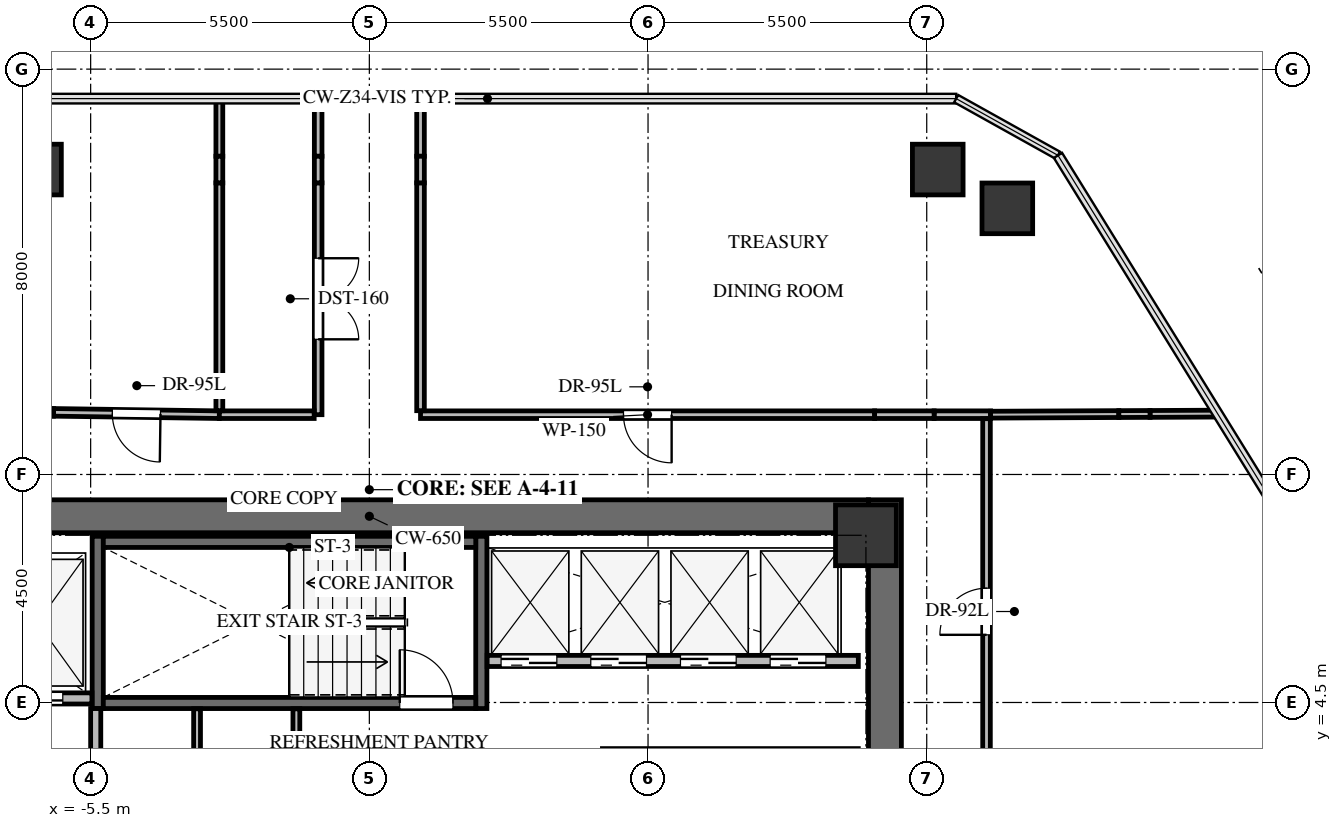
"""IFC4 building model, lengths in metres.
Left out: names, types, materials, properties, quantities, classifications, styles, units other than length and angle.
Written with IfcOpenShell. Run it as: python <this file> out.ifc"""

import sys

from ifc_helpers import new_model, si_unit, direction, frame, frame_2d, origin, origin_2d, place, context, subcontext, project, spatial, rectangle, extrude, source, transform, mapped, element, fill, save


model = new_model("IFC4")
c1 = context("Model", 3, precision=1e-05, world=origin(), true_north=direction((0.0, 1.0)))
c2 = subcontext(c1, "Body", "Model", "MODEL_VIEW")
j1 = project(units=[si_unit("LENGTHUNIT", "METRE"), si_unit("PLANEANGLEUNIT", "RADIAN")], contexts=[c1])
p1 = place(None, origin())
s1 = spatial("IfcSite", under=j1, at=p1, CompositionType="ELEMENT")
p2 = place(p1, origin())
s2 = spatial("IfcBuilding", under=s1, at=p2, CompositionType="ELEMENT")
p3 = place(p2, frame((0.0, 0.0, 203.2)))
s3 = spatial("IfcBuildingStorey", under=s2, at=p3, CompositionType="ELEMENT", Elevation=203.2)
p4 = place(p3, frame((10.175, -8.5, 0.0), z_axis=(0.0, 0.0, 1.0), x_axis=(0.0, 1.0, 0.0)))
e1 = element("IfcWall", 1, at=p4, inside=s3, PredefinedType="SHEAR", context=c2, shape_type="SweptSolid", body=[
    extrude(rectangle(XDim=17.0, YDim=0.65, at=frame_2d((8.5, 0.0))), origin(), (0.0, 0.0, 1.0), 3.0),
])
p5 = place(p3, frame((-9.85, 8.175, 0.0), z_axis=(0.0, 0.0, 1.0), x_axis=(1.0, 0.0, 0.0)))
e2 = element("IfcWall", 2, at=p5, inside=s3, PredefinedType="SHEAR", context=c2, shape_type="SweptSolid", body=[
    extrude(rectangle(XDim=19.7, YDim=0.65, at=frame_2d((9.85, 0.0))), origin(), (0.0, 0.0, 1.0), 3.0),
])
for number, where, z_axis, x_axis in (
    (3, (2.21, 4.38, -0.24), (0.0, 0.0, 1.0), (0.0, 1.0, 0.0)),
    (4, (-5.36, 7.78, -0.24), (0.0, 0.0, 1.0), (0.0, -1.0, 0.0)),
):
    element("IfcWall", number, at=place(p3, frame(where, z_axis=z_axis, x_axis=x_axis)), inside=s3, PredefinedType="SHEAR", context=c2, shape_type="SweptSolid", body=[
        extrude(rectangle(XDim=3.4, YDim=0.22, at=frame_2d((1.7, 0.0))), origin(), (0.0, 0.0, 1.0), 3.0),
    ])
p6 = place(p3, frame((-5.25, 4.49, -0.24), z_axis=(0.0, 0.0, 1.0), x_axis=(1.0, 0.0, 0.0)))
e5 = element("IfcWall", 5, at=p6, inside=s3, PredefinedType="SHEAR", context=c2, shape_type="SweptSolid", body=[
    extrude(rectangle(XDim=7.35, YDim=0.22, at=frame_2d((3.675, 0.0))), origin(), (0.0, 0.0, 1.0), 3.0),
])
p7 = place(p6, frame((5.85, 0.0, 0.0)))
e6 = element("IfcOpeningElement", 6, at=p7, cuts=e5, PredefinedType="OPENING", context=c2, shape_type="SweptSolid", body=[
    extrude(rectangle(XDim=1.05, YDim=2.15, at=frame_2d((0.525, 1.075))), frame((0.0, 0.12, 0.0), z_axis=(0.0, -1.0, 0.0), x_axis=(1.0, 0.0, 0.0)), (0.0, 0.0, 1.0), 0.24),
])
p8 = place(p3, frame((2.1, 7.67, -0.24), z_axis=(0.0, 0.0, 1.0), x_axis=(-1.0, 0.0, 0.0)))
e7 = element("IfcWall", 7, at=p8, inside=s3, PredefinedType="SHEAR", context=c2, shape_type="SweptSolid", body=[
    extrude(rectangle(XDim=7.35, YDim=0.22, at=frame_2d((3.675, 0.0))), origin(), (0.0, 0.0, 1.0), 3.0),
])
m1 = source(origin(), c2, "Body", "SweptSolid", [
    extrude(rectangle(XDim=1.2, YDim=1.2, at=origin_2d()), origin(), (0.0, 0.0, 1.0), 3.0),
])
p9 = place(p3, frame((9.8, 7.8, -0.24), z_axis=(0.0, 0.0, 1.0), x_axis=(1.0, 0.0, 0.0)))
e8 = element("IfcColumn", 8, at=p9, inside=s3, PredefinedType="COLUMN", context=c2, shape_type="MappedRepresentation", body=[
    mapped(m1, transform((0.0, 0.0, 0.0), x_axis=(1.0, 0.0, 0.0), y_axis=(0.0, 1.0, 0.0), z_axis=(0.0, 0.0, 1.0), scale=1.0)),
])
m2 = source(origin(), c2, "Body", "SweptSolid", [
    extrude(rectangle(XDim=1.0, YDim=1.0, at=origin_2d()), origin(), (0.0, 0.0, 1.0), 3.0),
])
for number, where, z_axis, x_axis in (
    (9, (-6.579, 15.018, -0.24), (0.0, 0.0, 1.0), (1.0, 0.0, 0.0)),
    (10, (11.218, 15.018, -0.24), (0.0, 0.0, 1.0), (1.0, 0.0, 0.0)),
    (11, (12.591, 14.252, -0.24), (0.0, 0.0, 1.0), (1.0, 0.0, 0.0)),
):
    element("IfcColumn", number, at=place(p3, frame(where, z_axis=z_axis, x_axis=x_axis)), inside=s3, PredefinedType="COLUMN", context=c2, shape_type="MappedRepresentation", body=[
        mapped(m2, transform((0.0, 0.0, 0.0), x_axis=(1.0, 0.0, 0.0), y_axis=(0.0, 1.0, 0.0), z_axis=(0.0, 0.0, 1.0), scale=1.0)),
    ])
p10 = place(p3, frame((-9.65, 4.58, 0.0), z_axis=(0.0, 0.0, 1.0), x_axis=(1.0, 0.0, 0.0)))
e12 = element("IfcWall", 12, at=p10, inside=s3, PredefinedType="SOLIDWALL", context=c2, shape_type="SweptSolid", body=[
    extrude(rectangle(XDim=4.175, YDim=0.22, at=frame_2d((2.087, 0.0))), origin(), (0.0, 0.0, 1.0), 2.745),
])
p11 = place(p10, frame((0.4, 0.0, 0.0)))
e13 = element("IfcOpeningElement", 13, at=p11, cuts=e12, PredefinedType="OPENING", context=c2, shape_type="SweptSolid", body=[
    extrude(rectangle(XDim=1.2, YDim=2.15, at=frame_2d((0.6, 1.075))), frame((0.0, 0.12, 0.0), z_axis=(0.0, -1.0, 0.0), x_axis=(1.0, 0.0, 0.0)), (0.0, 0.0, 1.0), 0.24),
])
p12 = place(p10, frame((2.4, 0.0, 0.0)))
e14 = element("IfcOpeningElement", 14, at=p12, cuts=e12, PredefinedType="OPENING", context=c2, shape_type="SweptSolid", body=[
    extrude(rectangle(XDim=1.2, YDim=2.15, at=frame_2d((0.6, 1.075))), frame((0.0, 0.12, 0.0), z_axis=(0.0, -1.0, 0.0), x_axis=(1.0, 0.0, 0.0)), (0.0, 0.0, 1.0), 0.24),
])
p13 = place(p3, frame((-5.4, 0.354, 0.0), z_axis=(0.0, 0.0, 1.0), x_axis=(0.0, 1.0, 0.0)))
e15 = element("IfcWall", 15, at=p13, inside=s3, PredefinedType="SOLIDWALL", context=c2, shape_type="SweptSolid", body=[
    extrude(rectangle(XDim=4.026, YDim=0.2, at=frame_2d((2.013, 0.0))), origin(), (0.0, 0.0, 1.0), 2.745),
])
p14 = place(p13, frame((0.246, 0.0, 0.0)))
e16 = element("IfcOpeningElement", 16, at=p14, cuts=e15, PredefinedType="OPENING", context=c2, shape_type="SweptSolid", body=[
    extrude(rectangle(XDim=1.0, YDim=2.15, at=frame_2d((0.5, 1.075))), frame((0.0, 0.11, 0.0), z_axis=(0.0, -1.0, 0.0), x_axis=(1.0, 0.0, 0.0)), (0.0, 0.0, 1.0), 0.22),
])
p15 = place(p3, frame((2.325, 5.32, 0.0), z_axis=(0.0, 0.0, 1.0), x_axis=(1.0, 0.0, 0.0)))
e17 = element("IfcWall", 17, at=p15, inside=s3, PredefinedType="SOLIDWALL", context=c2, shape_type="SweptSolid", body=[
    extrude(rectangle(XDim=7.325, YDim=0.22, at=frame_2d((3.663, 0.0))), origin(), (0.0, 0.0, 1.0), 2.745),
])
p16 = place(p15, frame((0.275, 0.0, 0.0)))
e18 = element("IfcOpeningElement", 18, at=p16, cuts=e17, PredefinedType="OPENING", context=c2, shape_type="SweptSolid", body=[
    extrude(rectangle(XDim=1.1, YDim=2.15, at=frame_2d((0.55, 1.075))), frame((0.0, 0.12, 0.0), z_axis=(0.0, -1.0, 0.0), x_axis=(1.0, 0.0, 0.0)), (0.0, 0.0, 1.0), 0.24),
])
p17 = place(p15, frame((2.045, 0.0, 0.0)))
e19 = element("IfcOpeningElement", 19, at=p17, cuts=e17, PredefinedType="OPENING", context=c2, shape_type="SweptSolid", body=[
    extrude(rectangle(XDim=1.1, YDim=2.15, at=frame_2d((0.55, 1.075))), frame((0.0, 0.12, 0.0), z_axis=(0.0, -1.0, 0.0), x_axis=(1.0, 0.0, 0.0)), (0.0, 0.0, 1.0), 0.24),
])
p18 = place(p15, frame((3.815, 0.0, 0.0)))
e20 = element("IfcOpeningElement", 20, at=p18, cuts=e17, PredefinedType="OPENING", context=c2, shape_type="SweptSolid", body=[
    extrude(rectangle(XDim=1.1, YDim=2.15, at=frame_2d((0.55, 1.075))), frame((0.0, 0.12, 0.0), z_axis=(0.0, -1.0, 0.0), x_axis=(1.0, 0.0, 0.0)), (0.0, 0.0, 1.0), 0.24),
])
p19 = place(p15, frame((5.585, 0.0, 0.0)))
e21 = element("IfcOpeningElement", 21, at=p19, cuts=e17, PredefinedType="OPENING", context=c2, shape_type="SweptSolid", body=[
    extrude(rectangle(XDim=1.1, YDim=2.15, at=frame_2d((0.55, 1.075))), frame((0.0, 0.12, 0.0), z_axis=(0.0, -1.0, 0.0), x_axis=(1.0, 0.0, 0.0)), (0.0, 0.0, 1.0), 0.24),
])
p20 = place(p3, frame((-2.96, 10.18, 0.0), z_axis=(0.0, 0.0, 1.0), x_axis=(-0.999900650504, 0.014095712907, 0.0)))
e22 = element("IfcWall", 22, at=p20, inside=s3, PredefinedType="PARTITIONING", context=c2, shape_type="SweptSolid", body=[
    extrude(rectangle(XDim=3.273, YDim=0.15, at=frame_2d((1.637, 0.0))), origin(), (0.0, 0.0, 1.0), 2.308),
])
p21 = place(p20, frame((1.162, 0.0, 0.0)))
e23 = element("IfcOpeningElement", 23, at=p21, cuts=e22, PredefinedType="OPENING", context=c2, shape_type="SweptSolid", body=[
    extrude(rectangle(XDim=0.95, YDim=2.1, at=frame_2d((0.475, 1.05))), frame((0.0, 0.085, 0.0), z_axis=(0.0, -1.0, 0.0), x_axis=(1.0, 0.0, 0.0)), (0.0, 0.0, 1.0), 0.17),
])
p22 = place(p3, frame((-6.233, 10.226, 0.0), z_axis=(0.0, 0.0, 1.0), x_axis=(-0.999898893801, 0.014219781108, 0.0)))
e24 = element("IfcWall", 24, at=p22, inside=s3, PredefinedType="PARTITIONING", context=c2, shape_type="SweptSolid", body=[
    extrude(rectangle(XDim=1.082, YDim=0.15, at=frame_2d((0.541, 0.0))), origin(), (0.0, 0.0, 1.0), 1.942),
])
p23 = place(p3, frame((-1.01, 16.418, 0.0), z_axis=(0.0, 0.0, 1.0), x_axis=(0.0, -1.0, 0.0)))
e25 = element("IfcWall", 25, at=p23, inside=s3, PredefinedType="PARTITIONING", context=c2, shape_type="SweptSolid", body=[
    extrude(rectangle(XDim=1.137, YDim=0.15, at=frame_2d((0.569, 0.0))), origin(), (0.0, 0.0, 1.0), 2.745),
])
p24 = place(p3, frame((-1.01, 14.755, 0.0), z_axis=(0.0, 0.0, 1.0), x_axis=(0.0, -1.0, 0.0)))
e26 = element("IfcWall", 26, at=p24, inside=s3, PredefinedType="PARTITIONING", context=c2, shape_type="SweptSolid", body=[
    extrude(rectangle(XDim=4.575, YDim=0.15, at=frame_2d((2.288, 0.0))), origin(), (0.0, 0.0, 1.0), 2.745),
])
p25 = place(p24, frame((1.488, 0.0, 0.0)))
e27 = element("IfcOpeningElement", 27, at=p25, cuts=e26, PredefinedType="OPENING", context=c2, shape_type="SweptSolid", body=[
    extrude(rectangle(XDim=1.6, YDim=2.15, at=frame_2d((0.8, 1.075))), frame((0.0, 0.085, 0.0), z_axis=(0.0, -1.0, 0.0), x_axis=(1.0, 0.0, 0.0)), (0.0, 0.0, 1.0), 0.17),
])
p26 = place(p3, frame((-1.01, 15.281, 0.0), z_axis=(0.0, 0.0, 1.0), x_axis=(0.0, -1.0, 0.0)))
e28 = element("IfcWall", 28, at=p26, inside=s3, PredefinedType="PARTITIONING", context=c2, shape_type="SweptSolid", body=[
    extrude(rectangle(XDim=0.525, YDim=0.15, at=frame_2d((0.263, 0.0))), origin(), (0.0, 0.0, 1.0), 2.099),
])
p27 = place(p3, frame((-1.089, 10.18, 0.0), z_axis=(0.0, 0.0, 1.0), x_axis=(-1.0, 0.0, 0.0)))
e29 = element("IfcWall", 29, at=p27, inside=s3, PredefinedType="PARTITIONING", context=c2, shape_type="SweptSolid", body=[
    extrude(rectangle(XDim=1.871, YDim=0.15, at=frame_2d((0.936, 0.0))), origin(), (0.0, 0.0, 1.0), 2.745),
])
p28 = place(p3, frame((12.26, 10.18, 0.0), z_axis=(0.0, 0.0, 1.0), x_axis=(-1.0, 0.0, 0.0)))
e30 = element("IfcWall", 30, at=p28, inside=s3, PredefinedType="PARTITIONING", context=c2, shape_type="SweptSolid", body=[
    extrude(rectangle(XDim=1.114, YDim=0.15, at=frame_2d((0.557, 0.0))), origin(), (0.0, 0.0, 1.0), 2.745),
])
p29 = place(p3, frame((9.971, 10.18, 0.0), z_axis=(0.0, 0.0, 1.0), x_axis=(-1.0, 0.0, 0.0)))
e31 = element("IfcWall", 31, at=p29, inside=s3, PredefinedType="PARTITIONING", context=c2, shape_type="SweptSolid", body=[
    extrude(rectangle(XDim=8.961, YDim=0.15, at=frame_2d((4.481, 0.0))), origin(), (0.0, 0.0, 1.0), 2.308),
])
p30 = place(p29, frame((4.006, 0.0, 0.0)))
e32 = element("IfcOpeningElement", 32, at=p30, cuts=e31, PredefinedType="OPENING", context=c2, shape_type="SweptSolid", body=[
    extrude(rectangle(XDim=0.95, YDim=2.1, at=frame_2d((0.475, 1.05))), frame((0.0, 0.085, 0.0), z_axis=(0.0, -1.0, 0.0), x_axis=(1.0, 0.0, 0.0)), (0.0, 0.0, 1.0), 0.17),
])
p31 = place(p3, frame((11.146, 10.18, 0.0), z_axis=(0.0, 0.0, 1.0), x_axis=(-1.0, 0.0, 0.0)))
e33 = element("IfcWall", 33, at=p31, inside=s3, PredefinedType="PARTITIONING", context=c2, shape_type="SweptSolid", body=[
    extrude(rectangle(XDim=1.174, YDim=0.15, at=frame_2d((0.587, 0.0))), origin(), (0.0, 0.0, 1.0), 1.942),
])
p32 = place(p3, frame((1.01, 10.259, 0.0), z_axis=(0.0, 0.0, 1.0), x_axis=(0.0, 1.0, 0.0)))
e34 = element("IfcWall", 34, at=p32, inside=s3, PredefinedType="PARTITIONING", context=c2, shape_type="SweptSolid", body=[
    extrude(rectangle(XDim=4.496, YDim=0.15, at=frame_2d((2.248, 0.0))), origin(), (0.0, 0.0, 1.0), 2.745),
])
p33 = place(p3, frame((1.01, 15.281, 0.0), z_axis=(0.0, 0.0, 1.0), x_axis=(0.0, 1.0, 0.0)))
e35 = element("IfcWall", 35, at=p33, inside=s3, PredefinedType="PARTITIONING", context=c2, shape_type="SweptSolid", body=[
    extrude(rectangle(XDim=1.137, YDim=0.15, at=frame_2d((0.569, 0.0))), origin(), (0.0, 0.0, 1.0), 2.745),
])
p34 = place(p3, frame((1.01, 14.755, 0.0), z_axis=(0.0, 0.0, 1.0), x_axis=(0.0, 1.0, 0.0)))
e36 = element("IfcWall", 36, at=p34, inside=s3, PredefinedType="PARTITIONING", context=c2, shape_type="SweptSolid", body=[
    extrude(rectangle(XDim=0.525, YDim=0.15, at=frame_2d((0.263, 0.0))), origin(), (0.0, 0.0, 1.0), 2.099),
])
p35 = place(p3, frame((12.18, 2.49, 0.0), z_axis=(0.0, 0.0, 1.0), x_axis=(0.0, 1.0, 0.0)))
e37 = element("IfcWall", 37, at=p35, inside=s3, PredefinedType="PARTITIONING", context=c2, shape_type="SweptSolid", body=[
    extrude(rectangle(XDim=7.611, YDim=0.15, at=frame_2d((3.806, 0.0))), origin(), (0.0, 0.0, 1.0), 2.745),
])
p36 = place(p35, frame((3.345, 0.0, 0.0)))
e38 = element("IfcOpeningElement", 38, at=p36, cuts=e37, PredefinedType="OPENING", context=c2, shape_type="SweptSolid", body=[
    extrude(rectangle(XDim=0.92, YDim=2.1, at=frame_2d((0.46, 1.05))), frame((0.0, 0.085, 0.0), z_axis=(0.0, -1.0, 0.0), x_axis=(1.0, 0.0, 0.0)), (0.0, 0.0, 1.0), 0.17),
])
p37 = place(p3, frame((-3.4, 4.375, 0.0), z_axis=(0.0, 0.0, 1.0), x_axis=(0.0, -1.0, 0.0)))
e39 = element("IfcWall", 39, at=p37, inside=s3, PredefinedType="PARTITIONING", context=c2, shape_type="SweptSolid", body=[
    extrude(rectangle(XDim=2.586, YDim=0.135, at=frame_2d((1.293, 0.0))), origin(), (0.0, 0.0, 1.0), 2.745),
])
p38 = place(p3, frame((-1.44, 4.375, 0.0), z_axis=(0.0, 0.0, 1.0), x_axis=(0.0, -1.0, 0.0)))
e40 = element("IfcWall", 40, at=p38, inside=s3, PredefinedType="PARTITIONING", context=c2, shape_type="SweptSolid", body=[
    extrude(rectangle(XDim=2.561, YDim=0.135, at=frame_2d((1.281, 0.0))), origin(), (0.0, 0.0, 1.0), 2.745),
])
p39 = place(p3, frame((-2.96, 16.418, 0.0), z_axis=(0.0, 0.0, 1.0), x_axis=(0.0, -1.0, 0.0)))
e41 = element("IfcWall", 41, at=p39, inside=s3, PredefinedType="PARTITIONING", context=c2, shape_type="SweptSolid", body=[
    extrude(rectangle(XDim=1.137, YDim=0.135, at=frame_2d((0.569, 0.0))), origin(), (0.0, 0.0, 1.0), 2.745),
])
p40 = place(p3, frame((-2.96, 14.755, 0.0), z_axis=(0.0, 0.0, 1.0), x_axis=(0.0, -1.0, 0.0)))
e42 = element("IfcWall", 42, at=p40, inside=s3, PredefinedType="PARTITIONING", context=c2, shape_type="SweptSolid", body=[
    extrude(rectangle(XDim=4.496, YDim=0.135, at=frame_2d((2.248, 0.0))), origin(), (0.0, 0.0, 1.0), 2.745),
])
p41 = place(p3, frame((-2.96, 15.281, 0.0), z_axis=(0.0, 0.0, 1.0), x_axis=(0.0, -1.0, 0.0)))
e43 = element("IfcWall", 43, at=p41, inside=s3, PredefinedType="PARTITIONING", context=c2, shape_type="SweptSolid", body=[
    extrude(rectangle(XDim=0.525, YDim=0.135, at=frame_2d((0.263, 0.0))), origin(), (0.0, 0.0, 1.0), 2.099),
])
p42 = place(p3, frame((16.74, 10.201, 0.0), z_axis=(0.0, 0.0, 1.0), x_axis=(-0.999989521507, -0.004577868163, 0.0)))
e44 = element("IfcWall", 44, at=p42, inside=s3, PredefinedType="PARTITIONING", context=c2, shape_type="SweptSolid", body=[
    extrude(rectangle(XDim=1.333, YDim=0.135, at=frame_2d((0.667, 0.0))), origin(), (0.0, 0.0, 1.0), 2.745),
])
p43 = place(p3, frame((14.791, 10.192, 0.0), z_axis=(0.0, 0.0, 1.0), x_axis=(-0.999989725302, -0.004533132435, 0.0)))
e45 = element("IfcWall", 45, at=p43, inside=s3, PredefinedType="PARTITIONING", context=c2, shape_type="SweptSolid", body=[
    extrude(rectangle(XDim=2.531, YDim=0.135, at=frame_2d((1.266, 0.0))), origin(), (0.0, 0.0, 1.0), 2.745),
])
p44 = place(p3, frame((15.407, 10.195, 0.0), z_axis=(0.0, 0.0, 1.0), x_axis=(-0.999988671317, -0.004759961942, 0.0)))
e46 = element("IfcWall", 46, at=p44, inside=s3, PredefinedType="PARTITIONING", context=c2, shape_type="SweptSolid", body=[
    extrude(rectangle(XDim=0.615, YDim=0.135, at=frame_2d((0.308, 0.0))), origin(), (0.0, 0.0, 1.0), 2.099),
])
m3 = source(origin(), c2, "Body", "SweptSolid", [
    extrude(rectangle(XDim=1.05, YDim=2.15, at=frame_2d((0.525, 1.075))), frame((0.0, 0.025, 0.0), z_axis=(0.0, -1.0, 0.0), x_axis=(1.0, 0.0, 0.0)), (0.0, 0.0, 1.0), 0.05),
])
p45 = place(p7, origin())
e47 = element("IfcDoor", 47, at=p45, inside=s3, OperationType="SINGLE_SWING_LEFT", PredefinedType="DOOR", context=c2, shape_type="MappedRepresentation", body=[
    mapped(m3, transform((0.0, 0.0, 0.0), x_axis=(1.0, 0.0, 0.0), y_axis=(0.0, 1.0, 0.0), z_axis=(0.0, 0.0, 1.0), scale=1.0)),
])
fill(e6, e47)
m4 = source(origin(), c2, "Body", "SweptSolid", [
    extrude(rectangle(XDim=1.2, YDim=2.15, at=frame_2d((0.6, 1.075))), frame((0.0, 0.025, 0.0), z_axis=(0.0, -1.0, 0.0), x_axis=(1.0, 0.0, 0.0)), (0.0, 0.0, 1.0), 0.05),
])
p46 = place(p12, origin())
e48 = element("IfcDoor", 48, at=p46, inside=s3, OperationType="DOUBLE_DOOR_SLIDING", PredefinedType="DOOR", context=c2, shape_type="MappedRepresentation", body=[
    mapped(m4, transform((0.0, 0.0, 0.0), x_axis=(1.0, 0.0, 0.0), y_axis=(0.0, 1.0, 0.0), z_axis=(0.0, 0.0, 1.0), scale=1.0)),
])
fill(e14, e48)
m5 = source(origin(), c2, "Body", "SweptSolid", [
    extrude(rectangle(XDim=1.1, YDim=2.15, at=frame_2d((0.55, 1.075))), frame((0.0, 0.025, 0.0), z_axis=(0.0, -1.0, 0.0), x_axis=(1.0, 0.0, 0.0)), (0.0, 0.0, 1.0), 0.05),
])
p47 = place(p16, origin())
e49 = element("IfcDoor", 49, at=p47, inside=s3, OperationType="DOUBLE_DOOR_SLIDING", PredefinedType="DOOR", context=c2, shape_type="MappedRepresentation", body=[
    mapped(m5, transform((0.0, 0.0, 0.0), x_axis=(1.0, 0.0, 0.0), y_axis=(0.0, 1.0, 0.0), z_axis=(0.0, 0.0, 1.0), scale=1.0)),
])
fill(e18, e49)
p48 = place(p17, origin())
e50 = element("IfcDoor", 50, at=p48, inside=s3, OperationType="DOUBLE_DOOR_SLIDING", PredefinedType="DOOR", context=c2, shape_type="MappedRepresentation", body=[
    mapped(m5, transform((0.0, 0.0, 0.0), x_axis=(1.0, 0.0, 0.0), y_axis=(0.0, 1.0, 0.0), z_axis=(0.0, 0.0, 1.0), scale=1.0)),
])
fill(e19, e50)
p49 = place(p18, origin())
e51 = element("IfcDoor", 51, at=p49, inside=s3, OperationType="DOUBLE_DOOR_SLIDING", PredefinedType="DOOR", context=c2, shape_type="MappedRepresentation", body=[
    mapped(m5, transform((0.0, 0.0, 0.0), x_axis=(1.0, 0.0, 0.0), y_axis=(0.0, 1.0, 0.0), z_axis=(0.0, 0.0, 1.0), scale=1.0)),
])
fill(e20, e51)
p50 = place(p19, origin())
e52 = element("IfcDoor", 52, at=p50, inside=s3, OperationType="DOUBLE_DOOR_SLIDING", PredefinedType="DOOR", context=c2, shape_type="MappedRepresentation", body=[
    mapped(m5, transform((0.0, 0.0, 0.0), x_axis=(1.0, 0.0, 0.0), y_axis=(0.0, 1.0, 0.0), z_axis=(0.0, 0.0, 1.0), scale=1.0)),
])
fill(e21, e52)
m6 = source(origin(), c2, "Body", "SweptSolid", [
    extrude(rectangle(XDim=0.95, YDim=2.1, at=frame_2d((0.475, 1.05))), frame((0.0, 0.025, 0.0), z_axis=(0.0, -1.0, 0.0), x_axis=(1.0, 0.0, 0.0)), (0.0, 0.0, 1.0), 0.05),
])
p51 = place(p21, origin())
e53 = element("IfcDoor", 53, at=p51, inside=s3, OperationType="SINGLE_SWING_LEFT", PredefinedType="DOOR", context=c2, shape_type="MappedRepresentation", body=[
    mapped(m6, transform((0.0, 0.0, 0.0), x_axis=(1.0, 0.0, 0.0), y_axis=(0.0, 1.0, 0.0), z_axis=(0.0, 0.0, 1.0), scale=1.0)),
])
fill(e23, e53)
m7 = source(origin(), c2, "Body", "SweptSolid", [
    extrude(rectangle(XDim=1.6, YDim=2.15, at=frame_2d((0.8, 1.075))), frame((0.0, 0.025, 0.0), z_axis=(0.0, -1.0, 0.0), x_axis=(1.0, 0.0, 0.0)), (0.0, 0.0, 1.0), 0.05),
])
p52 = place(p25, origin())
e54 = element("IfcDoor", 54, at=p52, inside=s3, OperationType="DOUBLE_DOOR_SINGLE_SWING", PredefinedType="DOOR", context=c2, shape_type="MappedRepresentation", body=[
    mapped(m7, transform((0.0, 0.0, 0.0), x_axis=(1.0, 0.0, 0.0), y_axis=(0.0, 1.0, 0.0), z_axis=(0.0, 0.0, 1.0), scale=1.0)),
])
fill(e27, e54)
p53 = place(p30, origin())
e55 = element("IfcDoor", 55, at=p53, inside=s3, OperationType="SINGLE_SWING_LEFT", PredefinedType="DOOR", context=c2, shape_type="MappedRepresentation", body=[
    mapped(m6, transform((0.0, 0.0, 0.0), x_axis=(1.0, 0.0, 0.0), y_axis=(0.0, 1.0, 0.0), z_axis=(0.0, 0.0, 1.0), scale=1.0)),
])
fill(e32, e55)
m8 = source(origin(), c2, "Body", "SweptSolid", [
    extrude(rectangle(XDim=0.92, YDim=2.1, at=frame_2d((0.46, 1.05))), frame((0.0, 0.025, 0.0), z_axis=(0.0, -1.0, 0.0), x_axis=(1.0, 0.0, 0.0)), (0.0, 0.0, 1.0), 0.05),
])
p54 = place(p36, origin())
e56 = element("IfcDoor", 56, at=p54, inside=s3, OperationType="SINGLE_SWING_LEFT", PredefinedType="DOOR", context=c2, shape_type="MappedRepresentation", body=[
    mapped(m8, transform((0.0, 0.0, 0.0), x_axis=(1.0, 0.0, 0.0), y_axis=(0.0, 1.0, 0.0), z_axis=(0.0, 0.0, 1.0), scale=1.0)),
])
fill(e38, e56)
save(model, sys.argv[1])
